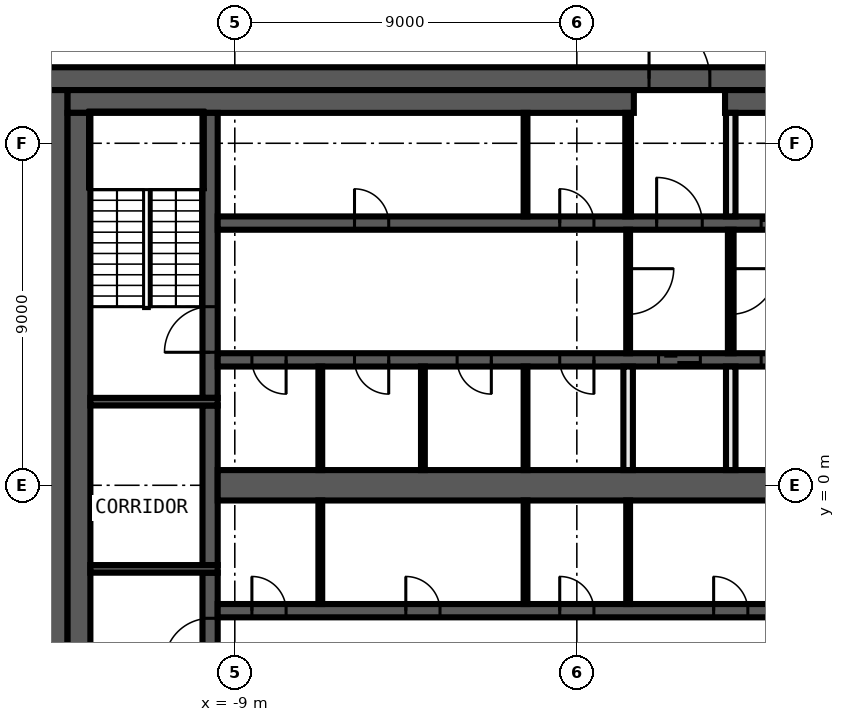
"""IFC4 building model, lengths in metres.
Left out: names, types, materials, properties, quantities, classifications, styles, units other than length and angle.
Written with IfcOpenShell. Run it as: python <this file> out.ifc"""

import sys

from ifc_helpers import new_model, si_unit, direction, frame, frame_2d, origin, place, context, subcontext, project, spatial, rectangle, extrude, element, fill, save


model = new_model("IFC4")
c1 = context("Model", 3, precision=1e-05, world=origin(), true_north=direction((0.0, 1.0)))
c2 = subcontext(c1, "Body", "Model", "MODEL_VIEW")
j1 = project(units=[si_unit("LENGTHUNIT", "METRE"), si_unit("PLANEANGLEUNIT", "RADIAN")], contexts=[c1])
p1 = place(None, origin())
s1 = spatial("IfcSite", under=j1, at=p1, CompositionType="ELEMENT")
p2 = place(p1, origin())
s2 = spatial("IfcBuilding", under=s1, at=p2, CompositionType="ELEMENT")
p3 = place(p2, frame((0.0, 0.0, 336.2)))
s3 = spatial("IfcBuildingStorey", under=s2, at=p3, CompositionType="ELEMENT", Elevation=336.2)
p4 = place(p3, frame((-14.0, 10.7, 0.0), z_axis=(0.0, 0.0, 1.0), x_axis=(1.0, 0.0, 0.0)))
e1 = element("IfcWall", 1, at=p4, inside=s3, PredefinedType="SHEAR", context=c2, shape_type="SweptSolid", body=[
    extrude(rectangle(XDim=28.0, YDim=0.6, at=frame_2d((14.0, 0.0))), origin(), (0.0, 0.0, 1.0), 3.82),
])
p5 = place(p4, frame((15.9, 0.0, 0.0)))
e2 = element("IfcOpeningElement", 2, at=p5, cuts=e1, PredefinedType="OPENING", context=c2, shape_type="SweptSolid", body=[
    extrude(rectangle(XDim=1.6, YDim=2.1, at=frame_2d((0.8, 1.05))), frame((0.0, 0.31, 0.0), z_axis=(0.0, -1.0, 0.0), x_axis=(1.0, 0.0, 0.0)), (0.0, 0.0, 1.0), 0.62),
])
p6 = place(p3, frame((-13.7, -10.4, 0.0), z_axis=(0.0, 0.0, 1.0), x_axis=(0.0, 1.0, 0.0)))
e3 = element("IfcWall", 3, at=p6, inside=s3, PredefinedType="SHEAR", context=c2, shape_type="SweptSolid", body=[
    extrude(rectangle(XDim=20.8, YDim=0.6, at=frame_2d((10.4, 0.0))), origin(), (0.0, 0.0, 1.0), 3.82),
])
p7 = place(p3, frame((-13.4, 10.1, 0.0), z_axis=(0.0, 0.0, 1.0), x_axis=(1.0, 0.0, 0.0)))
e4 = element("IfcWall", 4, at=p7, inside=s3, PredefinedType="SHEAR", context=c2, shape_type="SweptSolid", body=[
    extrude(rectangle(XDim=14.9, YDim=0.6, at=frame_2d((7.45, 0.0))), origin(), (0.0, 0.0, 1.0), 3.82),
])
p8 = place(p3, frame((3.9, 10.1, 0.0), z_axis=(0.0, 0.0, 1.0), x_axis=(1.0, 0.0, 0.0)))
e5 = element("IfcWall", 5, at=p8, inside=s3, PredefinedType="SHEAR", context=c2, shape_type="SweptSolid", body=[
    extrude(rectangle(XDim=9.5, YDim=0.6, at=frame_2d((4.75, 0.0))), origin(), (0.0, 0.0, 1.0), 3.82),
])
p9 = place(p3, frame((-13.1, -9.8, 0.0), z_axis=(0.0, 0.0, 1.0), x_axis=(0.0, 1.0, 0.0)))
e6 = element("IfcWall", 6, at=p9, inside=s3, PredefinedType="SHEAR", context=c2, shape_type="SweptSolid", body=[
    extrude(rectangle(XDim=19.6, YDim=0.6, at=frame_2d((9.8, 0.0))), origin(), (0.0, 0.0, 1.0), 3.82),
])
p10 = place(p3, frame((-9.65, -9.8, 0.0), z_axis=(0.0, 0.0, 1.0), x_axis=(0.0, 1.0, 0.0)))
e7 = element("IfcWall", 7, at=p10, inside=s3, PredefinedType="SHEAR", context=c2, shape_type="SweptSolid", body=[
    extrude(rectangle(XDim=7.5, YDim=0.4, at=frame_2d((3.75, 0.0))), origin(), (0.0, 0.0, 1.0), 3.82),
])
p11 = place(p10, frame((5.1, 0.0, 0.0)))
e8 = element("IfcOpeningElement", 8, at=p11, cuts=e7, PredefinedType="OPENING", context=c2, shape_type="SweptSolid", body=[
    extrude(rectangle(XDim=1.2, YDim=2.1, at=frame_2d((0.6, 1.05))), frame((0.0, 0.21, 0.0), z_axis=(0.0, -1.0, 0.0), x_axis=(1.0, 0.0, 0.0)), (0.0, 0.0, 1.0), 0.42),
])
p12 = place(p3, frame((-9.65, -2.1, 0.0), z_axis=(0.0, 0.0, 1.0), x_axis=(0.0, 1.0, 0.0)))
e9 = element("IfcWall", 9, at=p12, inside=s3, PredefinedType="SHEAR", context=c2, shape_type="SweptSolid", body=[
    extrude(rectangle(XDim=4.2, YDim=0.4, at=frame_2d((2.1, 0.0))), origin(), (0.0, 0.0, 1.0), 3.82),
])
p13 = place(p3, frame((-9.65, 2.3, 0.0), z_axis=(0.0, 0.0, 1.0), x_axis=(0.0, 1.0, 0.0)))
e10 = element("IfcWall", 10, at=p13, inside=s3, PredefinedType="SHEAR", context=c2, shape_type="SweptSolid", body=[
    extrude(rectangle(XDim=7.5, YDim=0.4, at=frame_2d((3.75, 0.0))), origin(), (0.0, 0.0, 1.0), 3.82),
])
p14 = place(p13, frame((1.2, 0.0, 0.0)))
e11 = element("IfcOpeningElement", 11, at=p14, cuts=e10, PredefinedType="OPENING", context=c2, shape_type="SweptSolid", body=[
    extrude(rectangle(XDim=1.2, YDim=2.1, at=frame_2d((0.6, 1.05))), frame((0.0, 0.21, 0.0), z_axis=(0.0, -1.0, 0.0), x_axis=(1.0, 0.0, 0.0)), (0.0, 0.0, 1.0), 0.42),
])
for number, where, z_axis, x_axis in (
    (12, (-9.45, 2.2, 0.0), (0.0, 0.0, 1.0), (-1.0, 0.0, 0.0)),
    (13, (-9.45, -2.2, 0.0), (0.0, 0.0, 1.0), (-1.0, 0.0, 0.0)),
):
    element("IfcWall", number, at=place(p3, frame(where, z_axis=z_axis, x_axis=x_axis)), inside=s3, PredefinedType="SHEAR", context=c2, shape_type="SweptSolid", body=[
        extrude(rectangle(XDim=3.35, YDim=0.2, at=frame_2d((1.675, 0.0))), origin(), (0.0, 0.0, 1.0), 3.82),
    ])
p15 = place(p3, frame((-9.45, 6.9, 0.0), z_axis=(0.0, 0.0, 1.0), x_axis=(1.0, 0.0, 0.0)))
e14 = element("IfcWall", 14, at=p15, inside=s3, PredefinedType="SHEAR", context=c2, shape_type="SweptSolid", body=[
    extrude(rectangle(XDim=18.9, YDim=0.35, at=frame_2d((9.45, 0.0))), origin(), (0.0, 0.0, 1.0), 3.82),
])
p16 = place(p15, frame((11.55, 0.0, 0.0)))
e15 = element("IfcOpeningElement", 15, at=p16, cuts=e14, PredefinedType="OPENING", context=c2, shape_type="SweptSolid", body=[
    extrude(rectangle(XDim=1.2, YDim=2.1, at=frame_2d((0.6, 1.05))), frame((0.0, 0.185, 0.0), z_axis=(0.0, -1.0, 0.0), x_axis=(1.0, 0.0, 0.0)), (0.0, 0.0, 1.0), 0.37),
])
p17 = place(p15, frame((14.3, 0.0, 0.0)))
e16 = element("IfcOpeningElement", 16, at=p17, cuts=e14, PredefinedType="OPENING", context=c2, shape_type="SweptSolid", body=[
    extrude(rectangle(XDim=1.1, YDim=2.1, at=frame_2d((0.55, 1.05))), frame((0.0, 0.185, 0.0), z_axis=(0.0, -1.0, 0.0), x_axis=(1.0, 0.0, 0.0)), (0.0, 0.0, 1.0), 0.37),
])
p18 = place(p15, frame((17.0, 0.0, 0.0)))
e17 = element("IfcOpeningElement", 17, at=p18, cuts=e14, PredefinedType="OPENING", context=c2, shape_type="SweptSolid", body=[
    extrude(rectangle(XDim=1.1, YDim=2.1, at=frame_2d((0.55, 1.05))), frame((0.0, 0.185, 0.0), z_axis=(0.0, -1.0, 0.0), x_axis=(1.0, 0.0, 0.0)), (0.0, 0.0, 1.0), 0.37),
])
p19 = place(p15, frame((3.6, 0.0, 0.0)))
e18 = element("IfcOpeningElement", 18, at=p19, cuts=e14, PredefinedType="OPENING", context=c2, shape_type="SweptSolid", body=[
    extrude(rectangle(XDim=0.9, YDim=2.1, at=frame_2d((0.45, 1.05))), frame((0.0, 0.185, 0.0), z_axis=(0.0, -1.0, 0.0), x_axis=(1.0, 0.0, 0.0)), (0.0, 0.0, 1.0), 0.37),
])
p20 = place(p15, frame((9.0, 0.0, 0.0)))
e19 = element("IfcOpeningElement", 19, at=p20, cuts=e14, PredefinedType="OPENING", context=c2, shape_type="SweptSolid", body=[
    extrude(rectangle(XDim=0.9, YDim=2.1, at=frame_2d((0.45, 1.05))), frame((0.0, 0.185, 0.0), z_axis=(0.0, -1.0, 0.0), x_axis=(1.0, 0.0, 0.0)), (0.0, 0.0, 1.0), 0.37),
])
p21 = place(p3, frame((9.45, 3.3, 0.0), z_axis=(0.0, 0.0, 1.0), x_axis=(-1.0, 0.0, 0.0)))
e20 = element("IfcWall", 20, at=p21, inside=s3, PredefinedType="SHEAR", context=c2, shape_type="SweptSolid", body=[
    extrude(rectangle(XDim=18.9, YDim=0.35, at=frame_2d((9.45, 0.0))), origin(), (0.0, 0.0, 1.0), 3.82),
])
p22 = place(p21, frame((6.2, 0.0, 0.0)))
e21 = element("IfcOpeningElement", 21, at=p22, cuts=e20, PredefinedType="OPENING", context=c2, shape_type="SweptSolid", body=[
    extrude(rectangle(XDim=1.1, YDim=2.1, at=frame_2d((0.55, 1.05))), frame((0.0, 0.185, 0.0), z_axis=(0.0, -1.0, 0.0), x_axis=(1.0, 0.0, 0.0)), (0.0, 0.0, 1.0), 0.37),
])
p23 = place(p21, frame((3.5, 0.0, 0.0)))
e22 = element("IfcOpeningElement", 22, at=p23, cuts=e20, PredefinedType="OPENING", context=c2, shape_type="SweptSolid", body=[
    extrude(rectangle(XDim=1.1, YDim=2.1, at=frame_2d((0.55, 1.05))), frame((0.0, 0.185, 0.0), z_axis=(0.0, -1.0, 0.0), x_axis=(1.0, 0.0, 0.0)), (0.0, 0.0, 1.0), 0.37),
])
p24 = place(p21, frame((0.9, 0.0, 0.0)))
e23 = element("IfcOpeningElement", 23, at=p24, cuts=e20, PredefinedType="OPENING", context=c2, shape_type="SweptSolid", body=[
    extrude(rectangle(XDim=0.9, YDim=2.1, at=frame_2d((0.45, 1.05))), frame((0.0, 0.185, 0.0), z_axis=(0.0, -1.0, 0.0), x_axis=(1.0, 0.0, 0.0)), (0.0, 0.0, 1.0), 0.37),
])
p25 = place(p21, frame((17.1, 0.0, 0.0)))
e24 = element("IfcOpeningElement", 24, at=p25, cuts=e20, PredefinedType="OPENING", context=c2, shape_type="SweptSolid", body=[
    extrude(rectangle(XDim=0.9, YDim=2.1, at=frame_2d((0.45, 1.05))), frame((0.0, 0.185, 0.0), z_axis=(0.0, -1.0, 0.0), x_axis=(1.0, 0.0, 0.0)), (0.0, 0.0, 1.0), 0.37),
])
p26 = place(p21, frame((14.4, 0.0, 0.0)))
e25 = element("IfcOpeningElement", 25, at=p26, cuts=e20, PredefinedType="OPENING", context=c2, shape_type="SweptSolid", body=[
    extrude(rectangle(XDim=0.9, YDim=2.1, at=frame_2d((0.45, 1.05))), frame((0.0, 0.185, 0.0), z_axis=(0.0, -1.0, 0.0), x_axis=(1.0, 0.0, 0.0)), (0.0, 0.0, 1.0), 0.37),
])
p27 = place(p21, frame((11.7, 0.0, 0.0)))
e26 = element("IfcOpeningElement", 26, at=p27, cuts=e20, PredefinedType="OPENING", context=c2, shape_type="SweptSolid", body=[
    extrude(rectangle(XDim=0.9, YDim=2.1, at=frame_2d((0.45, 1.05))), frame((0.0, 0.185, 0.0), z_axis=(0.0, -1.0, 0.0), x_axis=(1.0, 0.0, 0.0)), (0.0, 0.0, 1.0), 0.37),
])
p28 = place(p21, frame((9.0, 0.0, 0.0)))
e27 = element("IfcOpeningElement", 27, at=p28, cuts=e20, PredefinedType="OPENING", context=c2, shape_type="SweptSolid", body=[
    extrude(rectangle(XDim=0.9, YDim=2.1, at=frame_2d((0.45, 1.05))), frame((0.0, 0.185, 0.0), z_axis=(0.0, -1.0, 0.0), x_axis=(1.0, 0.0, 0.0)), (0.0, 0.0, 1.0), 0.37),
])
p29 = place(p3, frame((-9.45, -3.3, 0.0), z_axis=(0.0, 0.0, 1.0), x_axis=(1.0, 0.0, 0.0)))
e28 = element("IfcWall", 28, at=p29, inside=s3, PredefinedType="SHEAR", context=c2, shape_type="SweptSolid", body=[
    extrude(rectangle(XDim=18.9, YDim=0.35, at=frame_2d((9.45, 0.0))), origin(), (0.0, 0.0, 1.0), 3.82),
])
p30 = place(p29, frame((17.0, 0.0, 0.0)))
e29 = element("IfcOpeningElement", 29, at=p30, cuts=e28, PredefinedType="OPENING", context=c2, shape_type="SweptSolid", body=[
    extrude(rectangle(XDim=1.1, YDim=2.1, at=frame_2d((0.55, 1.05))), frame((0.0, 0.185, 0.0), z_axis=(0.0, -1.0, 0.0), x_axis=(1.0, 0.0, 0.0)), (0.0, 0.0, 1.0), 0.37),
])
p31 = place(p29, frame((0.9, 0.0, 0.0)))
e30 = element("IfcOpeningElement", 30, at=p31, cuts=e28, PredefinedType="OPENING", context=c2, shape_type="SweptSolid", body=[
    extrude(rectangle(XDim=0.9, YDim=2.1, at=frame_2d((0.45, 1.05))), frame((0.0, 0.185, 0.0), z_axis=(0.0, -1.0, 0.0), x_axis=(1.0, 0.0, 0.0)), (0.0, 0.0, 1.0), 0.37),
])
p32 = place(p29, frame((4.95, 0.0, 0.0)))
e31 = element("IfcOpeningElement", 31, at=p32, cuts=e28, PredefinedType="OPENING", context=c2, shape_type="SweptSolid", body=[
    extrude(rectangle(XDim=0.9, YDim=2.1, at=frame_2d((0.45, 1.05))), frame((0.0, 0.185, 0.0), z_axis=(0.0, -1.0, 0.0), x_axis=(1.0, 0.0, 0.0)), (0.0, 0.0, 1.0), 0.37),
])
p33 = place(p29, frame((9.0, 0.0, 0.0)))
e32 = element("IfcOpeningElement", 32, at=p33, cuts=e28, PredefinedType="OPENING", context=c2, shape_type="SweptSolid", body=[
    extrude(rectangle(XDim=0.9, YDim=2.1, at=frame_2d((0.45, 1.05))), frame((0.0, 0.185, 0.0), z_axis=(0.0, -1.0, 0.0), x_axis=(1.0, 0.0, 0.0)), (0.0, 0.0, 1.0), 0.37),
])
p34 = place(p29, frame((13.05, 0.0, 0.0)))
e33 = element("IfcOpeningElement", 33, at=p34, cuts=e28, PredefinedType="OPENING", context=c2, shape_type="SweptSolid", body=[
    extrude(rectangle(XDim=0.9, YDim=2.1, at=frame_2d((0.45, 1.05))), frame((0.0, 0.185, 0.0), z_axis=(0.0, -1.0, 0.0), x_axis=(1.0, 0.0, 0.0)), (0.0, 0.0, 1.0), 0.37),
])
p35 = place(p3, frame((-9.45, 0.0, 0.0), z_axis=(0.0, 0.0, 1.0), x_axis=(1.0, 0.0, 0.0)))
e34 = element("IfcWall", 34, at=p35, inside=s3, PredefinedType="SHEAR", context=c2, shape_type="SweptSolid", body=[
    extrude(rectangle(XDim=18.9, YDim=0.8, at=frame_2d((9.45, 0.0))), origin(), (0.0, 0.0, 1.0), 3.82),
])
p36 = place(p3, frame((4.05, 6.725, 0.0), z_axis=(0.0, 0.0, 1.0), x_axis=(0.0, -1.0, 0.0)))
e35 = element("IfcWall", 35, at=p36, inside=s3, PredefinedType="PARTITIONING", context=c2, shape_type="SweptSolid", body=[
    extrude(rectangle(XDim=3.25, YDim=0.15, at=frame_2d((1.625, 0.0))), origin(), (0.0, 0.0, 1.0), 3.82),
])
p37 = place(p36, frame((1.025, 0.0, 0.0)))
e36 = element("IfcOpeningElement", 36, at=p37, cuts=e35, PredefinedType="OPENING", context=c2, shape_type="SweptSolid", body=[
    extrude(rectangle(XDim=1.2, YDim=2.1, at=frame_2d((0.6, 1.05))), frame((0.0, 0.085, 0.0), z_axis=(0.0, -1.0, 0.0), x_axis=(1.0, 0.0, 0.0)), (0.0, 0.0, 1.0), 0.17),
])
for number, where, z_axis, x_axis in (
    (37, (4.05, 0.4, 0.0), (0.0, 0.0, 1.0), (0.0, 1.0, 0.0)),
    (38, (4.05, 7.075, 0.0), (0.0, 0.0, 1.0), (0.0, 1.0, 0.0)),
):
    element("IfcWall", number, at=place(p3, frame(where, z_axis=z_axis, x_axis=x_axis)), inside=s3, PredefinedType="SOLIDWALL", context=c2, shape_type="SweptSolid", body=[
        extrude(rectangle(XDim=2.725, YDim=0.25, at=frame_2d((1.363, 0.0))), origin(), (0.0, 0.0, 1.0), 3.82),
    ])
p38 = place(p3, frame((1.35, 7.075, 0.0), z_axis=(0.0, 0.0, 1.0), x_axis=(0.0, 1.0, 0.0)))
e39 = element("IfcWall", 39, at=p38, inside=s3, PredefinedType="PARTITIONING", context=c2, shape_type="SweptSolid", body=[
    extrude(rectangle(XDim=2.725, YDim=0.15, at=frame_2d((1.363, 0.0))), origin(), (0.0, 0.0, 1.0), 3.82),
])
p39 = place(p3, frame((1.35, -3.125, 0.0), z_axis=(0.0, 0.0, 1.0), x_axis=(0.0, 1.0, 0.0)))
e40 = element("IfcWall", 40, at=p39, inside=s3, PredefinedType="PARTITIONING", context=c2, shape_type="SweptSolid", body=[
    extrude(rectangle(XDim=2.725, YDim=0.1, at=frame_2d((1.363, 0.0))), origin(), (0.0, 0.0, 1.0), 3.82),
])
p40 = place(p3, frame((1.35, 6.725, 0.0), z_axis=(0.0, 0.0, 1.0), x_axis=(0.0, -1.0, 0.0)))
e41 = element("IfcWall", 41, at=p40, inside=s3, PredefinedType="PARTITIONING", context=c2, shape_type="SweptSolid", body=[
    extrude(rectangle(XDim=3.25, YDim=0.1, at=frame_2d((1.625, 0.0))), origin(), (0.0, 0.0, 1.0), 3.82),
])
p41 = place(p40, frame((1.025, 0.0, 0.0)))
e42 = element("IfcOpeningElement", 42, at=p41, cuts=e41, PredefinedType="OPENING", context=c2, shape_type="SweptSolid", body=[
    extrude(rectangle(XDim=1.2, YDim=2.1, at=frame_2d((0.6, 1.05))), frame((0.0, 0.06, 0.0), z_axis=(0.0, -1.0, 0.0), x_axis=(1.0, 0.0, 0.0)), (0.0, 0.0, 1.0), 0.12),
])
p42 = place(p3, frame((1.35, 0.4, 0.0), z_axis=(0.0, 0.0, 1.0), x_axis=(0.0, 1.0, 0.0)))
e43 = element("IfcWall", 43, at=p42, inside=s3, PredefinedType="SOLIDWALL", context=c2, shape_type="SweptSolid", body=[
    extrude(rectangle(XDim=2.725, YDim=0.25, at=frame_2d((1.363, 0.0))), origin(), (0.0, 0.0, 1.0), 3.82),
])
for number, where, z_axis, x_axis in (
    (44, (-1.35, -3.125, 0.0), (0.0, 0.0, 1.0), (0.0, 1.0, 0.0)),
    (45, (-1.35, 0.4, 0.0), (0.0, 0.0, 1.0), (0.0, 1.0, 0.0)),
    (46, (-1.35, 7.075, 0.0), (0.0, 0.0, 1.0), (0.0, 1.0, 0.0)),
    (47, (-4.05, 0.4, 0.0), (0.0, 0.0, 1.0), (0.0, 1.0, 0.0)),
    (48, (-6.75, -3.125, 0.0), (0.0, 0.0, 1.0), (0.0, 1.0, 0.0)),
    (49, (-6.75, 0.4, 0.0), (0.0, 0.0, 1.0), (0.0, 1.0, 0.0)),
):
    element("IfcWall", number, at=place(p3, frame(where, z_axis=z_axis, x_axis=x_axis)), inside=s3, PredefinedType="PARTITIONING", context=c2, shape_type="SweptSolid", body=[
        extrude(rectangle(XDim=2.725, YDim=0.1, at=frame_2d((1.363, 0.0))), origin(), (0.0, 0.0, 1.0), 3.82),
    ])
p43 = place(p5, origin())
e50 = element("IfcDoor", 50, at=p43, inside=s3, OperationType="DOUBLE_DOOR_SINGLE_SWING", PredefinedType="DOOR", context=c2, shape_type="SweptSolid", body=[
    extrude(rectangle(XDim=1.6, YDim=2.1, at=frame_2d((0.8, 1.05))), frame((0.0, 0.025, 0.0), z_axis=(0.0, -1.0, 0.0), x_axis=(1.0, 0.0, 0.0)), (0.0, 0.0, 1.0), 0.05),
])
fill(e2, e50)
p44 = place(p16, origin())
e51 = element("IfcDoor", 51, at=p44, inside=s3, OperationType="SINGLE_SWING_LEFT", PredefinedType="DOOR", context=c2, shape_type="SweptSolid", body=[
    extrude(rectangle(XDim=1.2, YDim=2.1, at=frame_2d((0.6, 1.05))), frame((0.0, 0.025, 0.0), z_axis=(0.0, -1.0, 0.0), x_axis=(1.0, 0.0, 0.0)), (0.0, 0.0, 1.0), 0.05),
])
fill(e15, e51)
p45 = place(p17, origin())
e52 = element("IfcDoor", 52, at=p45, inside=s3, OperationType="DOUBLE_DOOR_SLIDING", PredefinedType="DOOR", context=c2, shape_type="SweptSolid", body=[
    extrude(rectangle(XDim=1.1, YDim=2.1, at=frame_2d((0.55, 1.05))), frame((0.0, 0.025, 0.0), z_axis=(0.0, -1.0, 0.0), x_axis=(1.0, 0.0, 0.0)), (0.0, 0.0, 1.0), 0.05),
])
fill(e16, e52)
p46 = place(p22, origin())
e53 = element("IfcDoor", 53, at=p46, inside=s3, OperationType="DOUBLE_DOOR_SLIDING", PredefinedType="DOOR", context=c2, shape_type="SweptSolid", body=[
    extrude(rectangle(XDim=1.1, YDim=2.1, at=frame_2d((0.55, 1.05))), frame((0.0, 0.025, 0.0), z_axis=(0.0, -1.0, 0.0), x_axis=(1.0, 0.0, 0.0)), (0.0, 0.0, 1.0), 0.05),
])
fill(e21, e53)
p47 = place(p23, origin())
e54 = element("IfcDoor", 54, at=p47, inside=s3, OperationType="DOUBLE_DOOR_SLIDING", PredefinedType="DOOR", context=c2, shape_type="SweptSolid", body=[
    extrude(rectangle(XDim=1.1, YDim=2.1, at=frame_2d((0.55, 1.05))), frame((0.0, 0.025, 0.0), z_axis=(0.0, -1.0, 0.0), x_axis=(1.0, 0.0, 0.0)), (0.0, 0.0, 1.0), 0.05),
])
fill(e22, e54)
p48 = place(p19, origin())
e55 = element("IfcDoor", 55, at=p48, inside=s3, OperationType="SINGLE_SWING_RIGHT", PredefinedType="DOOR", context=c2, shape_type="SweptSolid", body=[
    extrude(rectangle(XDim=0.9, YDim=2.1, at=frame_2d((0.45, 1.05))), frame((0.0, 0.025, 0.0), z_axis=(0.0, -1.0, 0.0), x_axis=(1.0, 0.0, 0.0)), (0.0, 0.0, 1.0), 0.05),
])
fill(e18, e55)
p49 = place(p20, origin())
e56 = element("IfcDoor", 56, at=p49, inside=s3, OperationType="SINGLE_SWING_LEFT", PredefinedType="DOOR", context=c2, shape_type="SweptSolid", body=[
    extrude(rectangle(XDim=0.9, YDim=2.1, at=frame_2d((0.45, 1.05))), frame((0.0, 0.025, 0.0), z_axis=(0.0, -1.0, 0.0), x_axis=(1.0, 0.0, 0.0)), (0.0, 0.0, 1.0), 0.05),
])
fill(e19, e56)
p50 = place(p25, origin())
e57 = element("IfcDoor", 57, at=p50, inside=s3, OperationType="SINGLE_SWING_RIGHT", PredefinedType="DOOR", context=c2, shape_type="SweptSolid", body=[
    extrude(rectangle(XDim=0.9, YDim=2.1, at=frame_2d((0.45, 1.05))), frame((0.0, 0.025, 0.0), z_axis=(0.0, -1.0, 0.0), x_axis=(1.0, 0.0, 0.0)), (0.0, 0.0, 1.0), 0.05),
])
fill(e24, e57)
p51 = place(p26, origin())
e58 = element("IfcDoor", 58, at=p51, inside=s3, OperationType="SINGLE_SWING_LEFT", PredefinedType="DOOR", context=c2, shape_type="SweptSolid", body=[
    extrude(rectangle(XDim=0.9, YDim=2.1, at=frame_2d((0.45, 1.05))), frame((0.0, 0.025, 0.0), z_axis=(0.0, -1.0, 0.0), x_axis=(1.0, 0.0, 0.0)), (0.0, 0.0, 1.0), 0.05),
])
fill(e25, e58)
p52 = place(p27, origin())
e59 = element("IfcDoor", 59, at=p52, inside=s3, OperationType="SINGLE_SWING_RIGHT", PredefinedType="DOOR", context=c2, shape_type="SweptSolid", body=[
    extrude(rectangle(XDim=0.9, YDim=2.1, at=frame_2d((0.45, 1.05))), frame((0.0, 0.025, 0.0), z_axis=(0.0, -1.0, 0.0), x_axis=(1.0, 0.0, 0.0)), (0.0, 0.0, 1.0), 0.05),
])
fill(e26, e59)
p53 = place(p28, origin())
e60 = element("IfcDoor", 60, at=p53, inside=s3, OperationType="SINGLE_SWING_LEFT", PredefinedType="DOOR", context=c2, shape_type="SweptSolid", body=[
    extrude(rectangle(XDim=0.9, YDim=2.1, at=frame_2d((0.45, 1.05))), frame((0.0, 0.025, 0.0), z_axis=(0.0, -1.0, 0.0), x_axis=(1.0, 0.0, 0.0)), (0.0, 0.0, 1.0), 0.05),
])
fill(e27, e60)
p54 = place(p31, origin())
e61 = element("IfcDoor", 61, at=p54, inside=s3, OperationType="SINGLE_SWING_RIGHT", PredefinedType="DOOR", context=c2, shape_type="SweptSolid", body=[
    extrude(rectangle(XDim=0.9, YDim=2.1, at=frame_2d((0.45, 1.05))), frame((0.0, 0.025, 0.0), z_axis=(0.0, -1.0, 0.0), x_axis=(1.0, 0.0, 0.0)), (0.0, 0.0, 1.0), 0.05),
])
fill(e30, e61)
p55 = place(p32, origin())
e62 = element("IfcDoor", 62, at=p55, inside=s3, OperationType="SINGLE_SWING_LEFT", PredefinedType="DOOR", context=c2, shape_type="SweptSolid", body=[
    extrude(rectangle(XDim=0.9, YDim=2.1, at=frame_2d((0.45, 1.05))), frame((0.0, 0.025, 0.0), z_axis=(0.0, -1.0, 0.0), x_axis=(1.0, 0.0, 0.0)), (0.0, 0.0, 1.0), 0.05),
])
fill(e31, e62)
p56 = place(p33, origin())
e63 = element("IfcDoor", 63, at=p56, inside=s3, OperationType="SINGLE_SWING_RIGHT", PredefinedType="DOOR", context=c2, shape_type="SweptSolid", body=[
    extrude(rectangle(XDim=0.9, YDim=2.1, at=frame_2d((0.45, 1.05))), frame((0.0, 0.025, 0.0), z_axis=(0.0, -1.0, 0.0), x_axis=(1.0, 0.0, 0.0)), (0.0, 0.0, 1.0), 0.05),
])
fill(e32, e63)
p57 = place(p34, origin())
e64 = element("IfcDoor", 64, at=p57, inside=s3, OperationType="SINGLE_SWING_LEFT", PredefinedType="DOOR", context=c2, shape_type="SweptSolid", body=[
    extrude(rectangle(XDim=0.9, YDim=2.1, at=frame_2d((0.45, 1.05))), frame((0.0, 0.025, 0.0), z_axis=(0.0, -1.0, 0.0), x_axis=(1.0, 0.0, 0.0)), (0.0, 0.0, 1.0), 0.05),
])
fill(e33, e64)
p58 = place(p14, origin())
e65 = element("IfcDoor", 65, at=p58, inside=s3, OperationType="SINGLE_SWING_RIGHT", PredefinedType="DOOR", context=c2, shape_type="SweptSolid", body=[
    extrude(rectangle(XDim=1.2, YDim=2.1, at=frame_2d((0.6, 1.05))), frame((0.0, 0.025, 0.0), z_axis=(0.0, -1.0, 0.0), x_axis=(1.0, 0.0, 0.0)), (0.0, 0.0, 1.0), 0.05),
])
fill(e11, e65)
p59 = place(p11, origin())
e66 = element("IfcDoor", 66, at=p59, inside=s3, OperationType="SINGLE_SWING_LEFT", PredefinedType="DOOR", context=c2, shape_type="SweptSolid", body=[
    extrude(rectangle(XDim=1.2, YDim=2.1, at=frame_2d((0.6, 1.05))), frame((0.0, 0.025, 0.0), z_axis=(0.0, -1.0, 0.0), x_axis=(1.0, 0.0, 0.0)), (0.0, 0.0, 1.0), 0.05),
])
fill(e8, e66)
p60 = place(p41, origin())
e67 = element("IfcDoor", 67, at=p60, inside=s3, OperationType="SINGLE_SWING_LEFT", PredefinedType="DOOR", context=c2, shape_type="SweptSolid", body=[
    extrude(rectangle(XDim=1.2, YDim=2.1, at=frame_2d((0.6, 1.05))), frame((0.0, 0.025, 0.0), z_axis=(0.0, -1.0, 0.0), x_axis=(1.0, 0.0, 0.0)), (0.0, 0.0, 1.0), 0.05),
])
fill(e42, e67)
p61 = place(p37, origin())
e68 = element("IfcDoor", 68, at=p61, inside=s3, OperationType="SINGLE_SWING_RIGHT", PredefinedType="DOOR", context=c2, shape_type="SweptSolid", body=[
    extrude(rectangle(XDim=1.2, YDim=2.1, at=frame_2d((0.6, 1.05))), frame((0.0, 0.025, 0.0), z_axis=(0.0, -1.0, 0.0), x_axis=(1.0, 0.0, 0.0)), (0.0, 0.0, 1.0), 0.05),
])
fill(e36, e68)
save(model, sys.argv[1])
